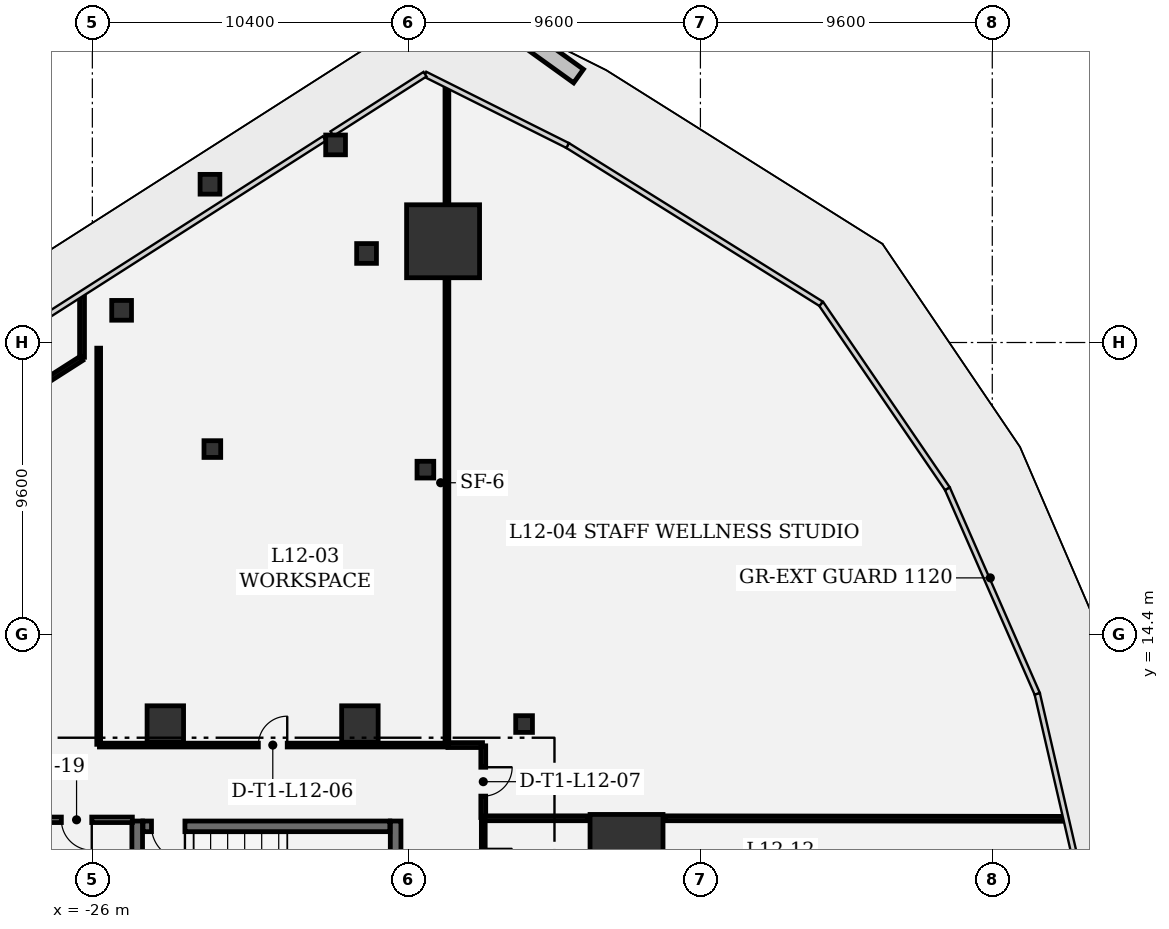
"""IFC4 building model, lengths in metres.
Left out: names, types, materials, properties, quantities, classifications, styles, units other than length and angle.
Written with IfcOpenShell. Run it as: python <this file> out.ifc"""

import sys

from ifc_helpers import new_model, si_unit, direction, frame, frame_2d, origin, origin_2d, place, context, subcontext, project, spatial, rectangle, extrude, element, fill, save


model = new_model("IFC4")
c1 = context("Model", 3, precision=1e-05, world=origin(), true_north=direction((0.0, 1.0)))
c2 = subcontext(c1, "Body", "Model", "MODEL_VIEW")
j1 = project(units=[si_unit("LENGTHUNIT", "METRE"), si_unit("PLANEANGLEUNIT", "RADIAN")], contexts=[c1])
p1 = place(None, origin())
s1 = spatial("IfcSite", under=j1, at=p1, CompositionType="ELEMENT")
p2 = place(p1, origin())
s2 = spatial("IfcBuilding", under=s1, at=p2, CompositionType="ELEMENT")
p3 = place(p2, frame((0.0, 0.0, 57.6)))
s3 = spatial("IfcBuildingStorey", under=s2, at=p3, CompositionType="ELEMENT", Elevation=57.6)
for number, where, z_axis, x_axis in (
    (1, (-8.43, 7.276, 0.0), (0.0, 0.0, 1.0), (1.0, 0.0, 0.0)),
    (2, (-14.464, 27.331, 0.0), (0.0, 0.0, 1.0), (1.0, 0.0, 0.0)),
):
    element("IfcColumn", number, at=place(p3, frame(where, z_axis=z_axis, x_axis=x_axis)), inside=s3, PredefinedType="COLUMN", context=c2, shape_type="SweptSolid", body=[
        extrude(rectangle(XDim=2.4, YDim=2.4, at=origin_2d()), origin(), (0.0, 0.0, 1.0), 4.2),
    ])
for number, where, z_axis, x_axis in (
    (3, (-23.6, 11.45, 0.0), (0.0, 0.0, 1.0), (1.0, 0.0, 0.0)),
    (4, (-17.2, 11.45, 0.0), (0.0, 0.0, 1.0), (1.0, 0.0, 0.0)),
):
    element("IfcColumn", number, at=place(p3, frame(where, z_axis=z_axis, x_axis=x_axis)), inside=s3, PredefinedType="COLUMN", context=c2, shape_type="SweptSolid", body=[
        extrude(rectangle(XDim=1.2, YDim=1.2, at=origin_2d()), origin(), (0.0, 0.0, 1.0), 4.2),
    ])
for number, where, z_axis, x_axis in (
    (5, (-22.131, 29.206, 0.0), (0.0, 0.0, 1.0), (1.0, 0.0, 0.0)),
    (6, (-18.0, 30.5, 0.0), (0.0, 0.0, 1.0), (1.0, 0.0, 0.0)),
    (7, (-25.038, 25.059, 0.0), (0.0, 0.0, 1.0), (1.0, 0.0, 0.0)),
    (8, (-16.981, 26.929, 0.0), (0.0, 0.0, 1.0), (1.0, 0.0, 0.0)),
):
    element("IfcColumn", number, at=place(p3, frame(where, z_axis=z_axis, x_axis=x_axis)), inside=s3, PredefinedType="COLUMN", context=c2, shape_type="SweptSolid", body=[
        extrude(rectangle(XDim=0.65, YDim=0.65, at=origin_2d()), origin(), (0.0, 0.0, 1.0), 4.2),
    ])
for number, where, z_axis, x_axis in (
    (9, (-22.053, 20.495, 0.0), (0.0, 0.0, 1.0), (1.0, 0.0, 0.0)),
    (10, (-15.046, 19.818, 0.0), (0.0, 0.0, 1.0), (1.0, 0.0, 0.0)),
    (11, (-11.8, 11.45, 0.0), (0.0, 0.0, 1.0), (1.0, 0.0, 0.0)),
):
    element("IfcColumn", number, at=place(p3, frame(where, z_axis=z_axis, x_axis=x_axis)), inside=s3, PredefinedType="COLUMN", context=c2, shape_type="SweptSolid", body=[
        extrude(rectangle(XDim=0.55, YDim=0.55, at=origin_2d()), origin(), (0.0, 0.0, 1.0), 4.2),
    ])
for number, where, z_axis, x_axis in (
    (12, (-24.525, 8.26, 0.0), (0.0, 0.0, 1.0), (0.0, -1.0, 0.0)),
    (13, (-16.025, 4.05, 0.0), (0.0, 0.0, 1.0), (0.0, 1.0, 0.0)),
):
    element("IfcWall", number, at=place(p3, frame(where, z_axis=z_axis, x_axis=x_axis)), inside=s3, PredefinedType="SHEAR", context=c2, shape_type="SweptSolid", body=[
        extrude(rectangle(XDim=4.21, YDim=0.35, at=frame_2d((2.105, 0.0))), origin(), (0.0, 0.0, 1.0), 3.92),
    ])
p4 = place(p3, frame((-16.215, 8.085, 0.0), z_axis=(0.0, 0.0, 1.0), x_axis=(-1.0, 0.0, 0.0)))
e14 = element("IfcWall", 14, at=p4, inside=s3, PredefinedType="SHEAR", context=c2, shape_type="SweptSolid", body=[
    extrude(rectangle(XDim=8.12, YDim=0.35, at=frame_2d((4.06, 0.0))), origin(), (0.0, 0.0, 1.0), 3.92),
])
p5 = place(p4, frame((6.74, 0.0, 0.0)))
e15 = element("IfcOpeningElement", 15, at=p5, cuts=e14, PredefinedType="OPENING", context=c2, shape_type="SweptSolid", body=[
    extrude(rectangle(XDim=1.1, YDim=2.2, at=frame_2d((0.55, 1.1))), frame((0.0, 0.185, 0.0), z_axis=(0.0, -1.0, 0.0), x_axis=(1.0, 0.0, 0.0)), (0.0, 0.0, 1.0), 0.37),
])
p6 = place(p3, frame((-24.684, 8.3, 0.0), z_axis=(0.0, 0.0, 1.0), x_axis=(-1.0, 0.0, 0.0)))
e16 = element("IfcWall", 16, at=p6, inside=s3, PredefinedType="PARTITIONING", context=c2, shape_type="SweptSolid", body=[
    extrude(rectangle(XDim=3.671, YDim=0.18, at=frame_2d((1.835, 0.0))), origin(), (0.0, 0.0, 1.0), 3.92),
])
p7 = place(p6, frame((1.335, 0.0, 0.0)))
e17 = element("IfcOpeningElement", 17, at=p7, cuts=e16, PredefinedType="OPENING", context=c2, shape_type="SweptSolid", body=[
    extrude(rectangle(XDim=1.0, YDim=2.15, at=frame_2d((0.5, 1.075))), frame((0.0, 0.1, 0.0), z_axis=(0.0, -1.0, 0.0), x_axis=(1.0, 0.0, 0.0)), (0.0, 0.0, 1.0), 0.2),
])
p8 = place(p3, frame((-26.361, 23.475, 0.0), z_axis=(0.0, 0.0, 1.0), x_axis=(-0.842613569098, -0.538518684143, 0.0)))
e18 = element("IfcWall", 18, at=p8, inside=s3, PredefinedType="PARTITIONING", context=c2, shape_type="SweptSolid", body=[
    extrude(rectangle(XDim=2.642, YDim=0.16, at=frame_2d((1.321, 0.0))), origin(), (0.0, 0.0, 1.0), 3.92),
])
p9 = place(p3, frame((-26.34, 23.514, 0.0), z_axis=(0.0, 0.0, 1.0), x_axis=(0.0, 1.0, 0.0)))
e19 = element("IfcWall", 19, at=p9, inside=s3, PredefinedType="PARTITIONING", context=c2, shape_type="SweptSolid", body=[
    extrude(rectangle(XDim=2.022, YDim=0.16, at=frame_2d((1.011, 0.0))), origin(), (0.0, 0.0, 1.0), 3.92),
])
p10 = place(p3, frame((-25.792, 23.814, 0.0), z_axis=(0.0, 0.0, 1.0), x_axis=(0.0, -1.0, 0.0)))
e20 = element("IfcWall", 20, at=p10, inside=s3, PredefinedType="PARTITIONING", context=c2, shape_type="SweptSolid", body=[
    extrude(rectangle(XDim=13.031, YDim=0.125, at=frame_2d((6.515, 0.0))), origin(), (0.0, 0.0, 1.0), 3.92),
])
p11 = place(p3, frame((-25.767, 10.758, 0.0), z_axis=(0.0, 0.0, 1.0), x_axis=(1.0, 0.0, 0.0)))
e21 = element("IfcWall", 21, at=p11, inside=s3, PredefinedType="PARTITIONING", context=c2, shape_type="SweptSolid", body=[
    extrude(rectangle(XDim=11.404, YDim=0.125, at=frame_2d((5.702, 0.0))), origin(), (0.0, 0.0, 1.0), 2.957),
])
p12 = place(p11, frame((5.227, 0.0, 0.0)))
e22 = element("IfcOpeningElement", 22, at=p12, cuts=e21, PredefinedType="OPENING", context=c2, shape_type="SweptSolid", body=[
    extrude(rectangle(XDim=0.95, YDim=2.15, at=frame_2d((0.475, 1.075))), frame((0.0, 0.073, 0.0), z_axis=(0.0, -1.0, 0.0), x_axis=(1.0, 0.0, 0.0)), (0.0, 0.0, 1.0), 0.145),
])
p13 = place(p3, frame((-14.338, 10.783, 0.0), z_axis=(0.0, 0.0, 1.0), x_axis=(0.0, 1.0, 0.0)))
e23 = element("IfcWall", 23, at=p13, inside=s3, PredefinedType="PARTITIONING", context=c2, shape_type="SweptSolid", body=[
    extrude(rectangle(XDim=15.282, YDim=0.125, at=frame_2d((7.641, 0.0))), origin(), (0.0, 0.0, 1.0), 2.89),
])
p14 = place(p3, frame((-14.338, 28.596, 0.0), z_axis=(0.0, 0.0, 1.0), x_axis=(0.0, 1.0, 0.0)))
e24 = element("IfcWall", 24, at=p14, inside=s3, PredefinedType="PARTITIONING", context=c2, shape_type="SweptSolid", body=[
    extrude(rectangle(XDim=3.79, YDim=0.125, at=frame_2d((1.895, 0.0))), origin(), (0.0, 0.0, 1.0), 3.92),
])
p15 = place(p3, frame((-14.305, 10.758, 0.0), z_axis=(0.0, 0.0, 1.0), x_axis=(1.0, 0.0, 0.0)))
e25 = element("IfcWall", 25, at=p15, inside=s3, PredefinedType="PARTITIONING", context=c2, shape_type="SweptSolid", body=[
    extrude(rectangle(XDim=1.138, YDim=0.16, at=frame_2d((0.569, 0.0))), origin(), (0.0, 0.0, 1.0), 3.92),
])
p16 = place(p3, frame((-13.142, 10.733, 0.0), z_axis=(0.0, 0.0, 1.0), x_axis=(0.0, -1.0, 0.0)))
e26 = element("IfcWall", 26, at=p16, inside=s3, PredefinedType="PARTITIONING", context=c2, shape_type="SweptSolid", body=[
    extrude(rectangle(XDim=2.358, YDim=0.16, at=frame_2d((1.179, 0.0))), origin(), (0.0, 0.0, 1.0), 3.92),
])
p17 = place(p16, frame((0.704, 0.0, 0.0)))
e27 = element("IfcOpeningElement", 27, at=p17, cuts=e26, PredefinedType="OPENING", context=c2, shape_type="SweptSolid", body=[
    extrude(rectangle(XDim=0.95, YDim=2.15, at=frame_2d((0.475, 1.075))), frame((0.0, 0.09, 0.0), z_axis=(0.0, -1.0, 0.0), x_axis=(1.0, 0.0, 0.0)), (0.0, 0.0, 1.0), 0.18),
])
p18 = place(p3, frame((-13.117, 8.35, 0.0), z_axis=(0.0, 0.0, 1.0), x_axis=(1.0, 0.0, 0.0)))
e28 = element("IfcWall", 28, at=p18, inside=s3, PredefinedType="PARTITIONING", context=c2, shape_type="SweptSolid", body=[
    extrude(rectangle(XDim=3.422, YDim=0.16, at=frame_2d((1.711, 0.0))), origin(), (0.0, 0.0, 1.0), 2.957),
])
p19 = place(p3, frame((-7.165, 8.35, 0.0), z_axis=(0.0, 0.0, 1.0), x_axis=(0.999999076287, -0.001359200353, 0.0)))
e29 = element("IfcWall", 29, at=p19, inside=s3, PredefinedType="PARTITIONING", context=c2, shape_type="SweptSolid", body=[
    extrude(rectangle(XDim=13.112, YDim=0.16, at=frame_2d((6.556, 0.0))), origin(), (0.0, 0.0, 1.0), 3.92),
])
p20 = place(p3, frame((-13.142, 8.317, 0.0), z_axis=(0.0, 0.0, 1.0), x_axis=(0.0, -1.0, 0.0)))
e30 = element("IfcWall", 30, at=p20, inside=s3, PredefinedType="PARTITIONING", context=c2, shape_type="SweptSolid", body=[
    extrude(rectangle(XDim=2.896, YDim=0.125, at=frame_2d((1.448, 0.0))), origin(), (0.0, 0.0, 1.0), 3.92),
])
p21 = place(p20, frame((0.973, 0.0, 0.0)))
e31 = element("IfcOpeningElement", 31, at=p21, cuts=e30, PredefinedType="OPENING", context=c2, shape_type="SweptSolid", body=[
    extrude(rectangle(XDim=0.95, YDim=2.15, at=frame_2d((0.475, 1.075))), frame((0.0, 0.073, 0.0), z_axis=(0.0, -1.0, 0.0), x_axis=(1.0, 0.0, 0.0)), (0.0, 0.0, 1.0), 0.145),
])
p22 = place(p5, origin())
e32 = element("IfcDoor", 32, at=p22, inside=s3, OperationType="SINGLE_SWING_LEFT", PredefinedType="DOOR", context=c2, shape_type="SweptSolid", body=[
    extrude(rectangle(XDim=1.1, YDim=2.2, at=frame_2d((0.55, 1.1))), frame((0.0, 0.025, 0.0), z_axis=(0.0, -1.0, 0.0), x_axis=(1.0, 0.0, 0.0)), (0.0, 0.0, 1.0), 0.05),
])
fill(e15, e32)
p23 = place(p12, origin())
e33 = element("IfcDoor", 33, at=p23, inside=s3, OperationType="SINGLE_SWING_RIGHT", PredefinedType="DOOR", context=c2, shape_type="SweptSolid", body=[
    extrude(rectangle(XDim=0.95, YDim=2.15, at=frame_2d((0.475, 1.075))), frame((0.0, 0.025, 0.0), z_axis=(0.0, -1.0, 0.0), x_axis=(1.0, 0.0, 0.0)), (0.0, 0.0, 1.0), 0.05),
])
fill(e22, e33)
p24 = place(p17, origin())
e34 = element("IfcDoor", 34, at=p24, inside=s3, OperationType="SINGLE_SWING_LEFT", PredefinedType="DOOR", context=c2, shape_type="SweptSolid", body=[
    extrude(rectangle(XDim=0.95, YDim=2.15, at=frame_2d((0.475, 1.075))), frame((0.0, 0.025, 0.0), z_axis=(0.0, -1.0, 0.0), x_axis=(1.0, 0.0, 0.0)), (0.0, 0.0, 1.0), 0.05),
])
fill(e27, e34)
p25 = place(p21, origin())
e35 = element("IfcDoor", 35, at=p25, inside=s3, OperationType="SINGLE_SWING_LEFT", PredefinedType="DOOR", context=c2, shape_type="SweptSolid", body=[
    extrude(rectangle(XDim=0.95, YDim=2.15, at=frame_2d((0.475, 1.075))), frame((0.0, 0.025, 0.0), z_axis=(0.0, -1.0, 0.0), x_axis=(1.0, 0.0, 0.0)), (0.0, 0.0, 1.0), 0.05),
])
fill(e31, e35)
p26 = place(p7, origin())
e36 = element("IfcDoor", 36, at=p26, inside=s3, OperationType="SINGLE_SWING_LEFT", PredefinedType="DOOR", context=c2, shape_type="SweptSolid", body=[
    extrude(rectangle(XDim=1.0, YDim=2.15, at=frame_2d((0.5, 1.075))), frame((0.0, 0.025, 0.0), z_axis=(0.0, -1.0, 0.0), x_axis=(1.0, 0.0, 0.0)), (0.0, 0.0, 1.0), 0.05),
])
fill(e17, e36)
save(model, sys.argv[1])
